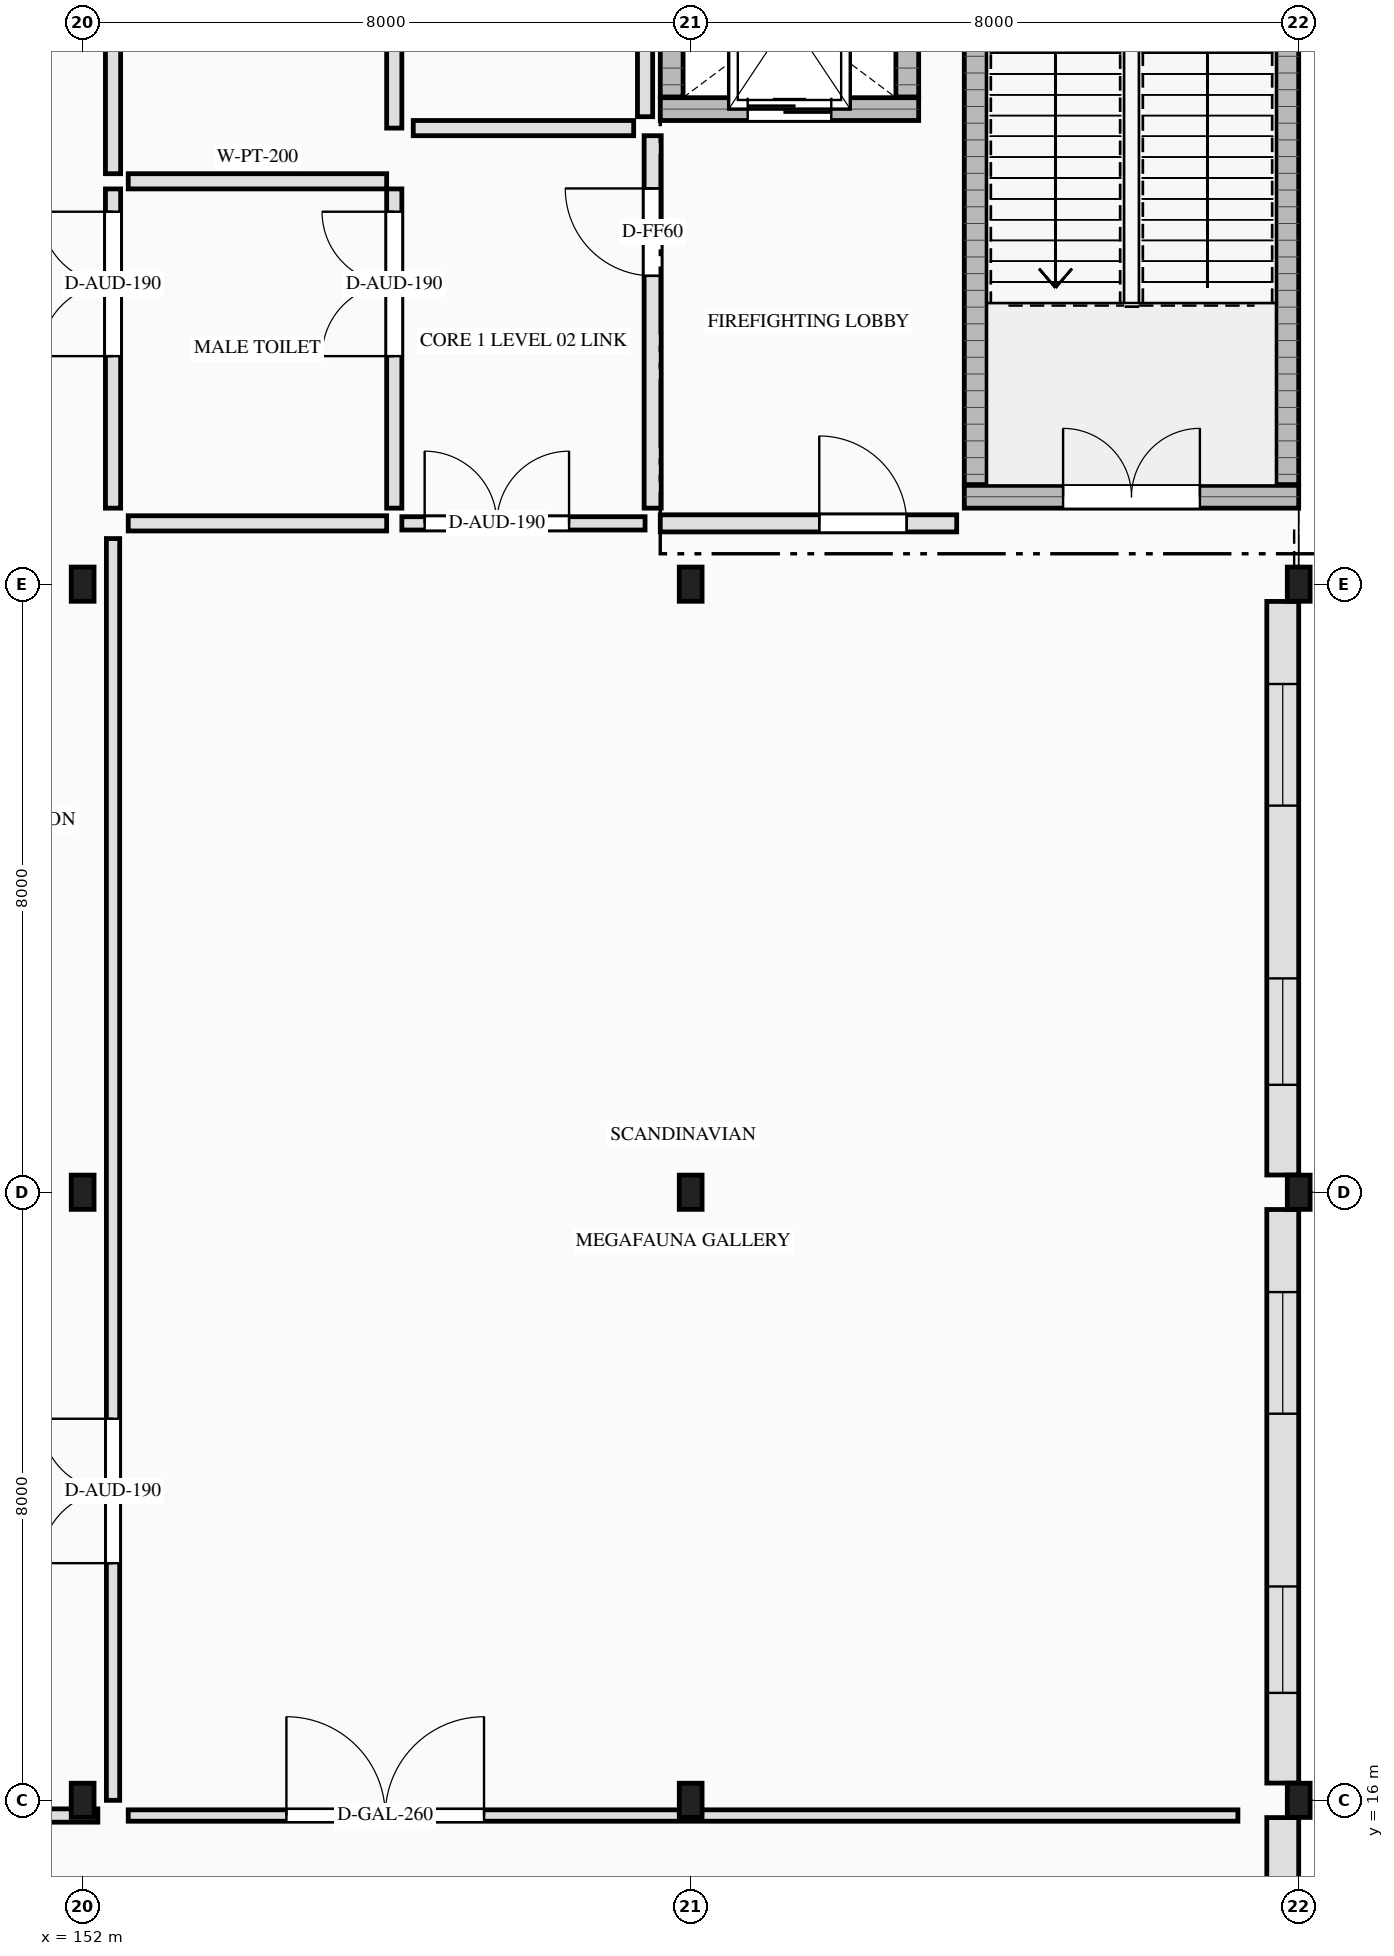
"""IFC4 building model, lengths in metres.
Left out: names, types, materials, properties, quantities, classifications, styles, units other than length and angle.
Written with IfcOpenShell. Run it as: python <this file> out.ifc"""

import sys

from ifc_helpers import new_model, si_unit, direction, frame, frame_2d, origin, origin_2d, place, context, subcontext, project, spatial, rectangle, i_section, extrude, element, fill, save


model = new_model("IFC4")
c1 = context("Model", 3, precision=1e-05, world=origin(), true_north=direction((0.0, 1.0)))
c2 = subcontext(c1, "Body", "Model", "MODEL_VIEW")
j1 = project(units=[si_unit("LENGTHUNIT", "METRE"), si_unit("PLANEANGLEUNIT", "RADIAN")], contexts=[c1])
p1 = place(None, origin())
s1 = spatial("IfcSite", under=j1, at=p1, CompositionType="ELEMENT")
p2 = place(p1, origin())
s2 = spatial("IfcBuilding", under=s1, at=p2, CompositionType="ELEMENT")
p3 = place(p2, frame((0.0, 0.0, 9.6)))
s3 = spatial("IfcBuildingStorey", under=s2, at=p3, CompositionType="ELEMENT", Elevation=9.6)
p4 = place(p3, frame((163.6, 33.15, 0.0), z_axis=(0.0, 0.0, 1.0), x_axis=(1.0, 0.0, 0.0)))
e1 = element("IfcWall", 1, at=p4, inside=s3, PredefinedType="SHEAR", context=c2, shape_type="SweptSolid", body=[
    extrude(rectangle(XDim=4.4, YDim=0.3, at=frame_2d((2.2, 0.0))), origin(), (0.0, 0.0, 1.0), 8.0),
])
p5 = place(p4, frame((1.3, 0.0, 0.0)))
e2 = element("IfcOpeningElement", 2, at=p5, cuts=e1, PredefinedType="OPENING", context=c2, shape_type="SweptSolid", body=[
    extrude(rectangle(XDim=1.8, YDim=2.2, at=frame_2d((0.9, 1.1))), frame((0.0, 0.16, 0.0), z_axis=(0.0, -1.0, 0.0), x_axis=(1.0, 0.0, 0.0)), (0.0, 0.0, 1.0), 0.32),
])
for number, where, z_axis, x_axis in (
    (3, (163.75, 33.31, 0.0), (0.0, 0.0, 1.0), (0.0, 1.0, 0.0)),
    (4, (167.85, 33.31, 0.0), (0.0, 0.0, 1.0), (0.0, 1.0, 0.0)),
):
    element("IfcWall", number, at=place(p3, frame(where, z_axis=z_axis, x_axis=x_axis)), inside=s3, PredefinedType="SHEAR", context=c2, shape_type="SweptSolid", body=[
        extrude(rectangle(XDim=9.38, YDim=0.3, at=frame_2d((4.69, 0.0))), origin(), (0.0, 0.0, 1.0), 8.0),
    ])
p6 = place(p3, frame((159.6, 38.25, 0.0), z_axis=(0.0, 0.0, 1.0), x_axis=(1.0, 0.0, 0.0)))
e5 = element("IfcWall", 5, at=p6, inside=s3, PredefinedType="SHEAR", context=c2, shape_type="SweptSolid", body=[
    extrude(rectangle(XDim=3.4, YDim=0.3, at=frame_2d((1.7, 0.0))), origin(), (0.0, 0.0, 1.0), 8.0),
])
p7 = place(p6, frame((1.15, 0.0, 0.0)))
e6 = element("IfcOpeningElement", 6, at=p7, cuts=e5, PredefinedType="OPENING", context=c2, shape_type="SweptSolid", body=[
    extrude(rectangle(XDim=1.1, YDim=2.15, at=frame_2d((0.55, 1.075))), frame((0.0, 0.16, 0.0), z_axis=(0.0, -1.0, 0.0), x_axis=(1.0, 0.0, 0.0)), (0.0, 0.0, 1.0), 0.32),
])
for number, where, z_axis, x_axis in (
    (7, (159.75, 38.41, 0.0), (0.0, 0.0, 1.0), (0.0, 1.0, 0.0)),
    (8, (162.85, 38.41, 0.0), (0.0, 0.0, 1.0), (0.0, 1.0, 0.0)),
):
    element("IfcWall", number, at=place(p3, frame(where, z_axis=z_axis, x_axis=x_axis)), inside=s3, PredefinedType="SHEAR", context=c2, shape_type="SweptSolid", body=[
        extrude(rectangle(XDim=2.08, YDim=0.3, at=frame_2d((1.04, 0.0))), origin(), (0.0, 0.0, 1.0), 8.0),
    ])
for number, where, z_axis, x_axis in (
    (9, (152.0, 16.0, 0.0), (0.0, 0.0, 1.0), (1.0, 0.0, 0.0)),
    (10, (152.0, 24.0, 0.0), (0.0, 0.0, 1.0), (1.0, 0.0, 0.0)),
    (11, (152.0, 32.0, 0.0), (0.0, 0.0, 1.0), (1.0, 0.0, 0.0)),
    (12, (160.0, 16.0, 0.0), (0.0, 0.0, 1.0), (1.0, 0.0, 0.0)),
    (13, (160.0, 24.0, 0.0), (0.0, 0.0, 1.0), (1.0, 0.0, 0.0)),
    (14, (160.0, 32.0, 0.0), (0.0, 0.0, 1.0), (1.0, 0.0, 0.0)),
    (15, (168.0, 16.0, 0.0), (0.0, 0.0, 1.0), (1.0, 0.0, 0.0)),
    (16, (168.0, 24.0, 0.0), (0.0, 0.0, 1.0), (1.0, 0.0, 0.0)),
    (17, (168.0, 32.0, 0.0), (0.0, 0.0, 1.0), (1.0, 0.0, 0.0)),
):
    element("IfcColumn", number, at=place(p3, frame(where, z_axis=z_axis, x_axis=x_axis)), inside=s3, PredefinedType="COLUMN", context=c2, shape_type="SweptSolid", body=[
        extrude(i_section(OverallWidth=0.3, OverallDepth=0.45, WebThickness=0.014, FlangeThickness=0.026, FilletRadius=0.027, at=origin_2d()), origin(), (0.0, 0.0, 1.0), 8.0),
    ])
p8 = place(p3, frame((167.79, 15.773, 0.0), z_axis=(0.0, 0.0, 1.0), x_axis=(0.0, -1.0, 0.0)))
e18 = element("IfcWall", 18, at=p8, inside=s3, PredefinedType="SOLIDWALL", context=c2, shape_type="SweptSolid", body=[
    extrude(rectangle(XDim=7.546, YDim=0.42, at=frame_2d((3.773, 0.0))), origin(), (0.0, 0.0, 1.0), 7.305),
])
p9 = place(p3, frame((167.79, 23.773, 0.0), z_axis=(0.0, 0.0, 1.0), x_axis=(0.0, -1.0, 0.0)))
e19 = element("IfcWall", 19, at=p9, inside=s3, PredefinedType="SOLIDWALL", context=c2, shape_type="SweptSolid", body=[
    extrude(rectangle(XDim=7.546, YDim=0.42, at=frame_2d((3.773, 0.0))), origin(), (0.0, 0.0, 1.0), 7.305),
])
p10 = place(p9, frame((1.086, 0.0, 0.85)))
e20 = element("IfcOpeningElement", 20, at=p10, cuts=e19, PredefinedType="OPENING", context=c2, shape_type="SweptSolid", body=[
    extrude(rectangle(XDim=1.6, YDim=3.6, at=frame_2d((0.8, 1.8))), frame((0.0, 0.22, 0.0), z_axis=(0.0, -1.0, 0.0), x_axis=(1.0, 0.0, 0.0)), (0.0, 0.0, 1.0), 0.44),
])
p11 = place(p9, frame((4.959, 0.0, 0.85)))
e21 = element("IfcOpeningElement", 21, at=p11, cuts=e19, PredefinedType="OPENING", context=c2, shape_type="SweptSolid", body=[
    extrude(rectangle(XDim=1.4, YDim=3.4, at=frame_2d((0.7, 1.7))), frame((0.0, 0.22, 0.0), z_axis=(0.0, -1.0, 0.0), x_axis=(1.0, 0.0, 0.0)), (0.0, 0.0, 1.0), 0.44),
])
p12 = place(p3, frame((167.79, 31.773, 0.0), z_axis=(0.0, 0.0, 1.0), x_axis=(0.0, -1.0, 0.0)))
e22 = element("IfcWall", 22, at=p12, inside=s3, PredefinedType="SOLIDWALL", context=c2, shape_type="SweptSolid", body=[
    extrude(rectangle(XDim=7.546, YDim=0.42, at=frame_2d((3.773, 0.0))), origin(), (0.0, 0.0, 1.0), 7.305),
])
p13 = place(p12, frame((1.086, 0.0, 0.85)))
e23 = element("IfcOpeningElement", 23, at=p13, cuts=e22, PredefinedType="OPENING", context=c2, shape_type="SweptSolid", body=[
    extrude(rectangle(XDim=1.6, YDim=3.6, at=frame_2d((0.8, 1.8))), frame((0.0, 0.22, 0.0), z_axis=(0.0, -1.0, 0.0), x_axis=(1.0, 0.0, 0.0)), (0.0, 0.0, 1.0), 0.44),
])
p14 = place(p12, frame((4.959, 0.0, 0.85)))
e24 = element("IfcOpeningElement", 24, at=p14, cuts=e22, PredefinedType="OPENING", context=c2, shape_type="SweptSolid", body=[
    extrude(rectangle(XDim=1.4, YDim=3.4, at=frame_2d((0.7, 1.7))), frame((0.0, 0.22, 0.0), z_axis=(0.0, -1.0, 0.0), x_axis=(1.0, 0.0, 0.0)), (0.0, 0.0, 1.0), 0.44),
])
p15 = place(p3, frame((159.5, 33.0, 0.0), z_axis=(0.0, 0.0, 1.0), x_axis=(0.0, 1.0, 0.0)))
e25 = element("IfcWall", 25, at=p15, inside=s3, PredefinedType="SOLIDWALL", context=c2, shape_type="SweptSolid", body=[
    extrude(rectangle(XDim=4.9, YDim=0.225, at=frame_2d((2.45, 0.0))), origin(), (0.0, 0.0, 1.0), 7.76),
])
p16 = place(p15, frame((3.056, 0.0, 0.0)))
e26 = element("IfcOpeningElement", 26, at=p16, cuts=e25, PredefinedType="OPENING", context=c2, shape_type="SweptSolid", body=[
    extrude(rectangle(XDim=1.15, YDim=2.2, at=frame_2d((0.575, 1.1))), frame((0.0, 0.123, 0.0), z_axis=(0.0, -1.0, 0.0), x_axis=(1.0, 0.0, 0.0)), (0.0, 0.0, 1.0), 0.245),
])
p17 = place(p3, frame((159.6, 32.8, 0.0), z_axis=(0.0, 0.0, 1.0), x_axis=(1.0, 0.0, 0.0)))
e27 = element("IfcWall", 27, at=p17, inside=s3, PredefinedType="SOLIDWALL", context=c2, shape_type="SweptSolid", body=[
    extrude(rectangle(XDim=3.9, YDim=0.225, at=frame_2d((1.95, 0.0))), origin(), (0.0, 0.0, 1.0), 7.76),
])
p18 = place(p17, frame((2.092, 0.0, 0.0)))
e28 = element("IfcOpeningElement", 28, at=p18, cuts=e27, PredefinedType="OPENING", context=c2, shape_type="SweptSolid", body=[
    extrude(rectangle(XDim=1.15, YDim=2.2, at=frame_2d((0.575, 1.1))), frame((0.0, 0.123, 0.0), z_axis=(0.0, -1.0, 0.0), x_axis=(1.0, 0.0, 0.0)), (0.0, 0.0, 1.0), 0.245),
])
p19 = place(p3, frame((152.6, 37.3, 0.0), z_axis=(0.0, 0.0, 1.0), x_axis=(1.0, 0.0, 0.0)))
e29 = element("IfcWall", 29, at=p19, inside=s3, PredefinedType="PARTITIONING", context=c2, shape_type="SweptSolid", body=[
    extrude(rectangle(XDim=3.4, YDim=0.2, at=frame_2d((1.7, 0.0))), origin(), (0.0, 0.0, 1.0), 7.76),
])
p20 = place(p3, frame((152.4, 33.0, 0.0), z_axis=(0.0, 0.0, 1.0), x_axis=(0.0, 1.0, 0.0)))
e30 = element("IfcWall", 30, at=p20, inside=s3, PredefinedType="PARTITIONING", context=c2, shape_type="SweptSolid", body=[
    extrude(rectangle(XDim=4.2, YDim=0.2, at=frame_2d((2.1, 0.0))), origin(), (0.0, 0.0, 1.0), 7.76),
])
p21 = place(p20, frame((2.0, 0.0, 0.0)))
e31 = element("IfcOpeningElement", 31, at=p21, cuts=e30, PredefinedType="OPENING", context=c2, shape_type="SweptSolid", body=[
    extrude(rectangle(XDim=1.9, YDim=2.35, at=frame_2d((0.95, 1.175))), frame((0.0, 0.11, 0.0), z_axis=(0.0, -1.0, 0.0), x_axis=(1.0, 0.0, 0.0)), (0.0, 0.0, 1.0), 0.22),
])
p22 = place(p3, frame((156.1, 33.0, 0.0), z_axis=(0.0, 0.0, 1.0), x_axis=(0.0, 1.0, 0.0)))
e32 = element("IfcWall", 32, at=p22, inside=s3, PredefinedType="PARTITIONING", context=c2, shape_type="SweptSolid", body=[
    extrude(rectangle(XDim=4.2, YDim=0.2, at=frame_2d((2.1, 0.0))), origin(), (0.0, 0.0, 1.0), 7.76),
])
p23 = place(p22, frame((2.0, 0.0, 0.0)))
e33 = element("IfcOpeningElement", 33, at=p23, cuts=e32, PredefinedType="OPENING", context=c2, shape_type="SweptSolid", body=[
    extrude(rectangle(XDim=1.9, YDim=2.35, at=frame_2d((0.95, 1.175))), frame((0.0, 0.11, 0.0), z_axis=(0.0, -1.0, 0.0), x_axis=(1.0, 0.0, 0.0)), (0.0, 0.0, 1.0), 0.22),
])
p24 = place(p3, frame((152.6, 32.8, 0.0), z_axis=(0.0, 0.0, 1.0), x_axis=(1.0, 0.0, 0.0)))
e34 = element("IfcWall", 34, at=p24, inside=s3, PredefinedType="PARTITIONING", context=c2, shape_type="SweptSolid", body=[
    extrude(rectangle(XDim=3.4, YDim=0.2, at=frame_2d((1.7, 0.0))), origin(), (0.0, 0.0, 1.0), 7.76),
])
p25 = place(p3, frame((156.1, 38.0, 0.0), z_axis=(0.0, 0.0, 1.0), x_axis=(0.0, 1.0, 0.0)))
e35 = element("IfcWall", 35, at=p25, inside=s3, PredefinedType="PARTITIONING", context=c2, shape_type="SweptSolid", body=[
    extrude(rectangle(XDim=3.6, YDim=0.2, at=frame_2d((1.8, 0.0))), origin(), (0.0, 0.0, 1.0), 7.76),
])
p26 = place(p3, frame((152.4, 37.4, 0.0), z_axis=(0.0, 0.0, 1.0), x_axis=(0.0, 1.0, 0.0)))
e36 = element("IfcWall", 36, at=p26, inside=s3, PredefinedType="PARTITIONING", context=c2, shape_type="SweptSolid", body=[
    extrude(rectangle(XDim=4.2, YDim=0.2, at=frame_2d((2.1, 0.0))), origin(), (0.0, 0.0, 1.0), 7.76),
])
p27 = place(p3, frame((149.0, 15.8, 0.0), z_axis=(0.0, 0.0, 1.0), x_axis=(1.0, 0.0, 0.0)))
e37 = element("IfcWall", 37, at=p27, inside=s3, PredefinedType="PARTITIONING", context=c2, shape_type="SweptSolid", body=[
    extrude(rectangle(XDim=3.2, YDim=0.175, at=frame_2d((1.6, 0.0))), origin(), (0.0, 0.0, 1.0), 7.37),
])
p28 = place(p3, frame((152.4, 16.0, 0.0), z_axis=(0.0, 0.0, 1.0), x_axis=(0.0, 1.0, 0.0)))
e38 = element("IfcWall", 38, at=p28, inside=s3, PredefinedType="PARTITIONING", context=c2, shape_type="SweptSolid", body=[
    extrude(rectangle(XDim=16.6, YDim=0.175, at=frame_2d((8.3, 0.0))), origin(), (0.0, 0.0, 1.0), 7.76),
])
p29 = place(p28, frame((3.12, 0.0, 0.0)))
e39 = element("IfcOpeningElement", 39, at=p29, cuts=e38, PredefinedType="OPENING", context=c2, shape_type="SweptSolid", body=[
    extrude(rectangle(XDim=1.9, YDim=2.35, at=frame_2d((0.95, 1.175))), frame((0.0, 0.097, 0.0), z_axis=(0.0, -1.0, 0.0), x_axis=(1.0, 0.0, 0.0)), (0.0, 0.0, 1.0), 0.195),
])
p30 = place(p3, frame((156.2, 32.8, 0.0), z_axis=(0.0, 0.0, 1.0), x_axis=(1.0, 0.0, 0.0)))
e40 = element("IfcWall", 40, at=p30, inside=s3, PredefinedType="PARTITIONING", context=c2, shape_type="SweptSolid", body=[
    extrude(rectangle(XDim=3.2, YDim=0.175, at=frame_2d((1.6, 0.0))), origin(), (0.0, 0.0, 1.0), 7.76),
])
p31 = place(p30, frame((0.3, 0.0, 0.0)))
e41 = element("IfcOpeningElement", 41, at=p31, cuts=e40, PredefinedType="OPENING", context=c2, shape_type="SweptSolid", body=[
    extrude(rectangle(XDim=1.9, YDim=2.35, at=frame_2d((0.95, 1.175))), frame((0.0, 0.097, 0.0), z_axis=(0.0, -1.0, 0.0), x_axis=(1.0, 0.0, 0.0)), (0.0, 0.0, 1.0), 0.195),
])
p32 = place(p3, frame((152.6, 15.8, 0.0), z_axis=(0.0, 0.0, 1.0), x_axis=(1.0, 0.0, 0.0)))
e42 = element("IfcWall", 42, at=p32, inside=s3, PredefinedType="PARTITIONING", context=c2, shape_type="SweptSolid", body=[
    extrude(rectangle(XDim=14.6, YDim=0.15, at=frame_2d((7.3, 0.0))), origin(), (0.0, 0.0, 1.0), 7.37),
])
p33 = place(p32, frame((2.081, 0.0, 0.0)))
e43 = element("IfcOpeningElement", 43, at=p33, cuts=e42, PredefinedType="OPENING", context=c2, shape_type="SweptSolid", body=[
    extrude(rectangle(XDim=2.6, YDim=2.9, at=frame_2d((1.3, 1.45))), frame((0.0, 0.085, 0.0), z_axis=(0.0, -1.0, 0.0), x_axis=(1.0, 0.0, 0.0)), (0.0, 0.0, 1.0), 0.17),
])
p34 = place(p3, frame((156.35, 38.0, 0.0), z_axis=(0.0, 0.0, 1.0), x_axis=(1.0, 0.0, 0.0)))
e44 = element("IfcWall", 44, at=p34, inside=s3, PredefinedType="PARTITIONING", context=c2, shape_type="SweptSolid", body=[
    extrude(rectangle(XDim=2.9, YDim=0.2, at=frame_2d((1.45, 0.0))), origin(), (0.0, 0.0, 1.0), 7.76),
])
p35 = place(p3, frame((159.4, 38.15, 0.0), z_axis=(0.0, 0.0, 1.0), x_axis=(0.0, 1.0, 0.0)))
e45 = element("IfcWall", 45, at=p35, inside=s3, PredefinedType="PARTITIONING", context=c2, shape_type="SweptSolid", body=[
    extrude(rectangle(XDim=3.3, YDim=0.2, at=frame_2d((1.65, 0.0))), origin(), (0.0, 0.0, 1.0), 7.76),
])
p36 = place(p10, origin())
e46 = element("IfcWindow", 46, at=p36, inside=s3, PartitioningType="DOUBLE_PANEL_VERTICAL", PredefinedType="WINDOW", context=c2, shape_type="SweptSolid", body=[
    extrude(rectangle(XDim=1.6, YDim=3.6, at=frame_2d((0.8, 1.8))), frame((0.0, 0.03, 0.0), z_axis=(0.0, -1.0, 0.0), x_axis=(1.0, 0.0, 0.0)), (0.0, 0.0, 1.0), 0.06),
])
fill(e20, e46)
p37 = place(p11, origin())
e47 = element("IfcWindow", 47, at=p37, inside=s3, PartitioningType="SINGLE_PANEL", PredefinedType="WINDOW", context=c2, shape_type="SweptSolid", body=[
    extrude(rectangle(XDim=1.4, YDim=3.4, at=frame_2d((0.7, 1.7))), frame((0.0, 0.03, 0.0), z_axis=(0.0, -1.0, 0.0), x_axis=(1.0, 0.0, 0.0)), (0.0, 0.0, 1.0), 0.06),
])
fill(e21, e47)
p38 = place(p13, origin())
e48 = element("IfcWindow", 48, at=p38, inside=s3, PartitioningType="DOUBLE_PANEL_VERTICAL", PredefinedType="WINDOW", context=c2, shape_type="SweptSolid", body=[
    extrude(rectangle(XDim=1.6, YDim=3.6, at=frame_2d((0.8, 1.8))), frame((0.0, 0.03, 0.0), z_axis=(0.0, -1.0, 0.0), x_axis=(1.0, 0.0, 0.0)), (0.0, 0.0, 1.0), 0.06),
])
fill(e23, e48)
p39 = place(p14, origin())
e49 = element("IfcWindow", 49, at=p39, inside=s3, PartitioningType="SINGLE_PANEL", PredefinedType="WINDOW", context=c2, shape_type="SweptSolid", body=[
    extrude(rectangle(XDim=1.4, YDim=3.4, at=frame_2d((0.7, 1.7))), frame((0.0, 0.03, 0.0), z_axis=(0.0, -1.0, 0.0), x_axis=(1.0, 0.0, 0.0)), (0.0, 0.0, 1.0), 0.06),
])
fill(e24, e49)
p40 = place(p5, origin())
e50 = element("IfcDoor", 50, at=p40, inside=s3, OperationType="DOUBLE_DOOR_SINGLE_SWING", PredefinedType="DOOR", context=c2, shape_type="SweptSolid", body=[
    extrude(rectangle(XDim=1.8, YDim=2.2, at=frame_2d((0.9, 1.1))), frame((0.0, 0.025, 0.0), z_axis=(0.0, -1.0, 0.0), x_axis=(1.0, 0.0, 0.0)), (0.0, 0.0, 1.0), 0.05),
])
fill(e2, e50)
p41 = place(p7, origin())
e51 = element("IfcDoor", 51, at=p41, inside=s3, OperationType="SLIDING_TO_LEFT", PredefinedType="DOOR", context=c2, shape_type="SweptSolid", body=[
    extrude(rectangle(XDim=1.1, YDim=2.15, at=frame_2d((0.55, 1.075))), frame((0.0, 0.025, 0.0), z_axis=(0.0, -1.0, 0.0), x_axis=(1.0, 0.0, 0.0)), (0.0, 0.0, 1.0), 0.05),
])
fill(e6, e51)
p42 = place(p16, origin())
e52 = element("IfcDoor", 52, at=p42, inside=s3, OperationType="SINGLE_SWING_RIGHT", PredefinedType="DOOR", context=c2, shape_type="SweptSolid", body=[
    extrude(rectangle(XDim=1.15, YDim=2.2, at=frame_2d((0.575, 1.1))), frame((0.0, 0.025, 0.0), z_axis=(0.0, -1.0, 0.0), x_axis=(1.0, 0.0, 0.0)), (0.0, 0.0, 1.0), 0.05),
])
fill(e26, e52)
p43 = place(p18, origin())
e53 = element("IfcDoor", 53, at=p43, inside=s3, OperationType="SINGLE_SWING_LEFT", PredefinedType="DOOR", context=c2, shape_type="SweptSolid", body=[
    extrude(rectangle(XDim=1.15, YDim=2.2, at=frame_2d((0.575, 1.1))), frame((0.0, 0.025, 0.0), z_axis=(0.0, -1.0, 0.0), x_axis=(1.0, 0.0, 0.0)), (0.0, 0.0, 1.0), 0.05),
])
fill(e28, e53)
p44 = place(p21, origin())
e54 = element("IfcDoor", 54, at=p44, inside=s3, OperationType="DOUBLE_DOOR_SINGLE_SWING", PredefinedType="DOOR", context=c2, shape_type="SweptSolid", body=[
    extrude(rectangle(XDim=1.9, YDim=2.35, at=frame_2d((0.95, 1.175))), frame((0.0, 0.025, 0.0), z_axis=(0.0, -1.0, 0.0), x_axis=(1.0, 0.0, 0.0)), (0.0, 0.0, 1.0), 0.05),
])
fill(e31, e54)
p45 = place(p23, origin())
e55 = element("IfcDoor", 55, at=p45, inside=s3, OperationType="DOUBLE_DOOR_SINGLE_SWING", PredefinedType="DOOR", context=c2, shape_type="SweptSolid", body=[
    extrude(rectangle(XDim=1.9, YDim=2.35, at=frame_2d((0.95, 1.175))), frame((0.0, 0.025, 0.0), z_axis=(0.0, -1.0, 0.0), x_axis=(1.0, 0.0, 0.0)), (0.0, 0.0, 1.0), 0.05),
])
fill(e33, e55)
p46 = place(p29, origin())
e56 = element("IfcDoor", 56, at=p46, inside=s3, OperationType="DOUBLE_DOOR_SINGLE_SWING", PredefinedType="DOOR", context=c2, shape_type="SweptSolid", body=[
    extrude(rectangle(XDim=1.9, YDim=2.35, at=frame_2d((0.95, 1.175))), frame((0.0, 0.025, 0.0), z_axis=(0.0, -1.0, 0.0), x_axis=(1.0, 0.0, 0.0)), (0.0, 0.0, 1.0), 0.05),
])
fill(e39, e56)
p47 = place(p31, origin())
e57 = element("IfcDoor", 57, at=p47, inside=s3, OperationType="DOUBLE_DOOR_SINGLE_SWING", PredefinedType="DOOR", context=c2, shape_type="SweptSolid", body=[
    extrude(rectangle(XDim=1.9, YDim=2.35, at=frame_2d((0.95, 1.175))), frame((0.0, 0.025, 0.0), z_axis=(0.0, -1.0, 0.0), x_axis=(1.0, 0.0, 0.0)), (0.0, 0.0, 1.0), 0.05),
])
fill(e41, e57)
p48 = place(p33, origin())
e58 = element("IfcDoor", 58, at=p48, inside=s3, OperationType="DOUBLE_DOOR_DOUBLE_SWING", PredefinedType="DOOR", context=c2, shape_type="SweptSolid", body=[
    extrude(rectangle(XDim=2.6, YDim=2.9, at=frame_2d((1.3, 1.45))), frame((0.0, 0.025, 0.0), z_axis=(0.0, -1.0, 0.0), x_axis=(1.0, 0.0, 0.0)), (0.0, 0.0, 1.0), 0.05),
])
fill(e43, e58)
save(model, sys.argv[1])
